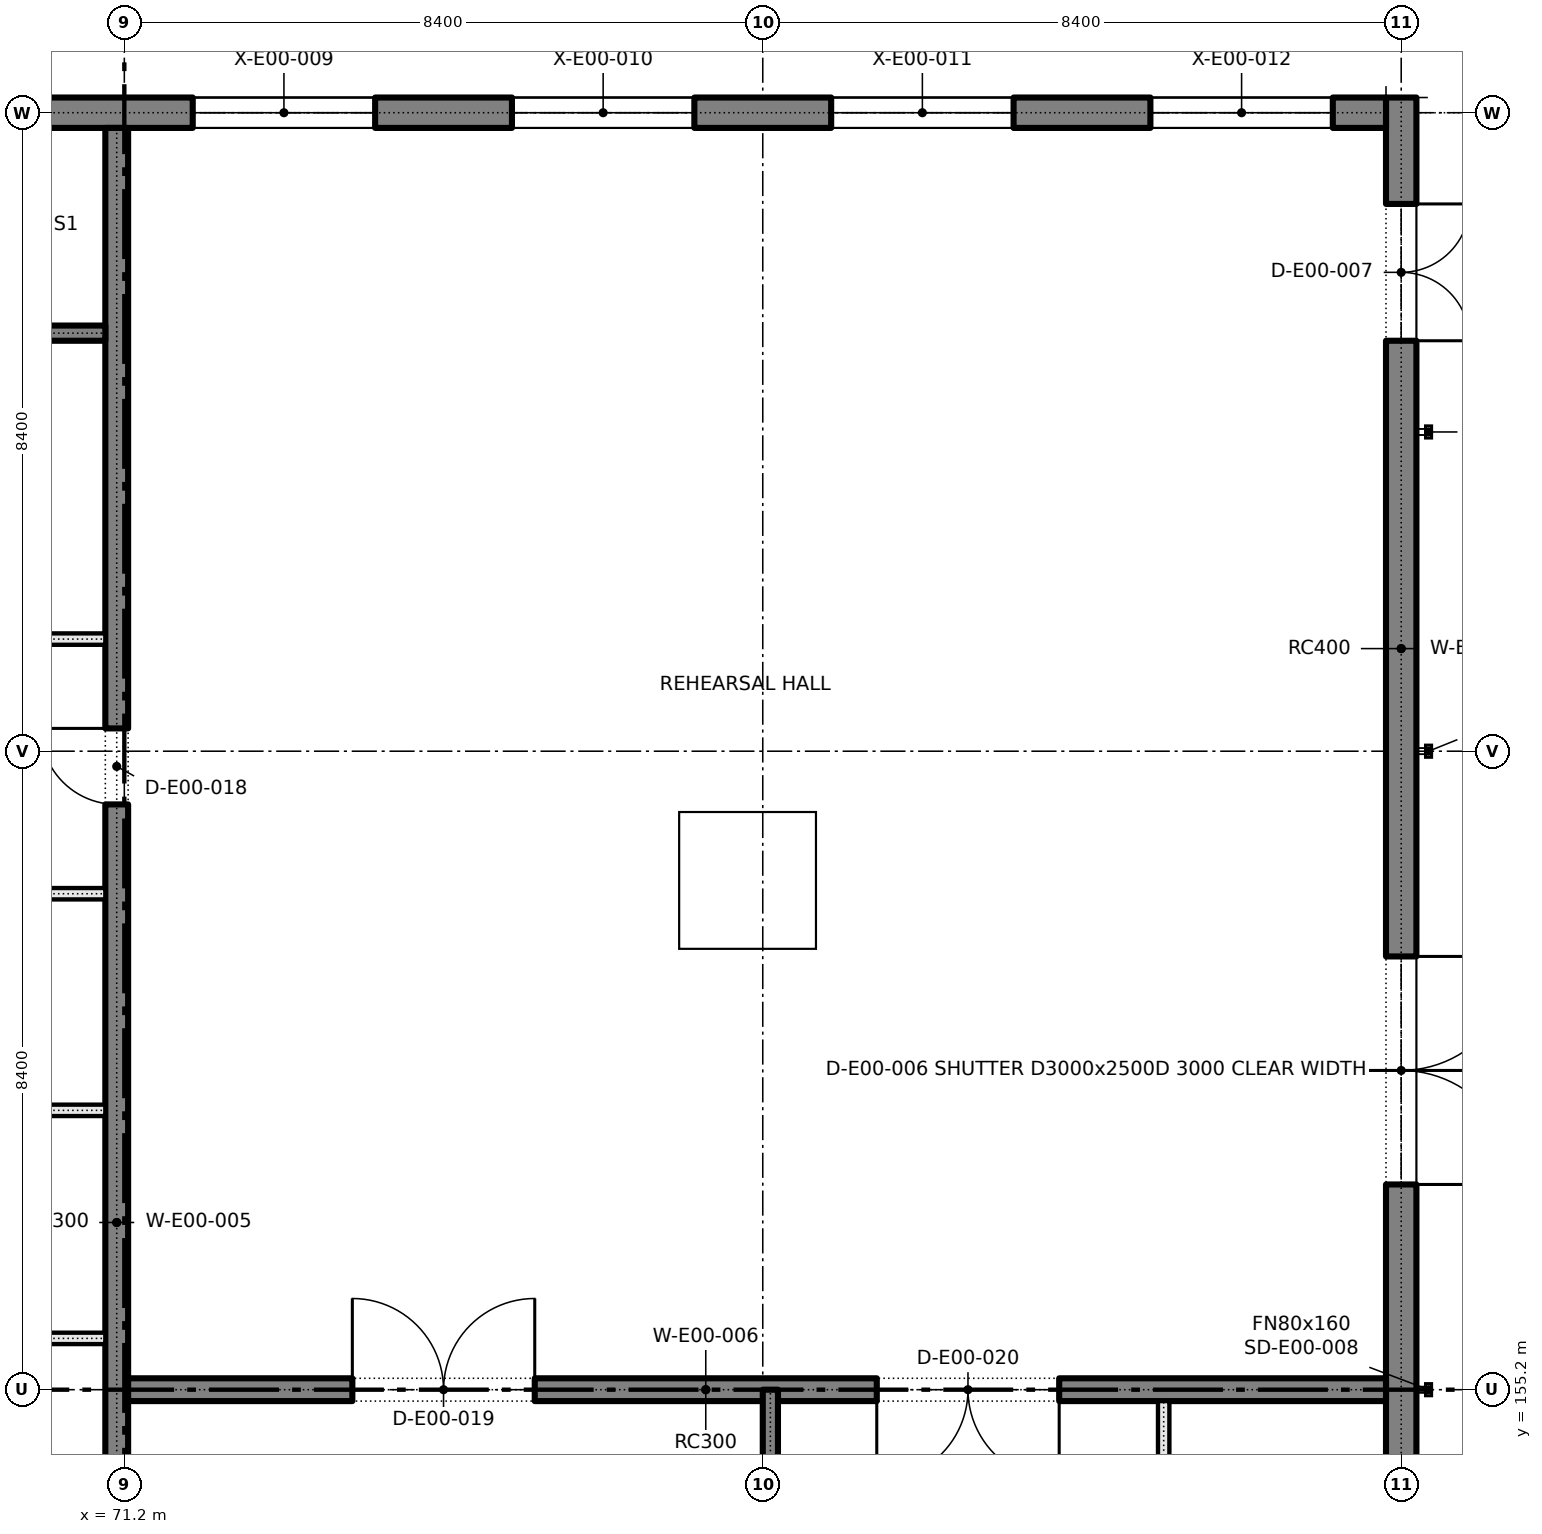
"""IFC4 building model, lengths in metres.
Left out: names, types, materials, properties, quantities, classifications, styles, units other than length and angle.
Written with IfcOpenShell. Run it as: python <this file> out.ifc"""

import sys

from ifc_helpers import new_model, si_unit, direction, frame, frame_2d, origin, place, context, subcontext, project, spatial, rectangle, extrude, element, fill, save


model = new_model("IFC4")
c1 = context("Model", 3, precision=1e-05, world=origin(), true_north=direction((0.0, 1.0)))
c2 = subcontext(c1, "Body", "Model", "MODEL_VIEW")
j1 = project(units=[si_unit("LENGTHUNIT", "METRE"), si_unit("PLANEANGLEUNIT", "RADIAN")], contexts=[c1])
p1 = place(None, origin())
s1 = spatial("IfcSite", under=j1, at=p1, CompositionType="ELEMENT")
p2 = place(p1, origin())
s2 = spatial("IfcBuilding", under=s1, at=p2, CompositionType="ELEMENT")
p3 = place(p2, origin())
s3 = spatial("IfcBuildingStorey", under=s2, at=p3, CompositionType="ELEMENT", Elevation=0.0)
p4 = place(p3, frame((88.0, 146.6, 0.0), z_axis=(0.0, 0.0, 1.0), x_axis=(0.0, 1.0, 0.0)))
e1 = element("IfcWall", 1, at=p4, inside=s3, PredefinedType="SOLIDWALL", context=c2, shape_type="SweptSolid", body=[
    extrude(rectangle(XDim=25.6, YDim=0.4, at=frame_2d((12.8, 0.0))), origin(), (0.0, 0.0, 1.0), 5.4),
])
p5 = place(p4, frame((11.3, 0.0, 0.0)))
e2 = element("IfcOpeningElement", 2, at=p5, cuts=e1, PredefinedType="OPENING", context=c2, shape_type="SweptSolid", body=[
    extrude(rectangle(XDim=3.0, YDim=2.5, at=frame_2d((1.5, 1.25))), frame((0.0, 0.21, 0.0), z_axis=(0.0, -1.0, 0.0), x_axis=(1.0, 0.0, 0.0)), (0.0, 0.0, 1.0), 0.42),
])
p6 = place(p4, frame((22.4, 0.0, 0.0)))
e3 = element("IfcOpeningElement", 3, at=p6, cuts=e1, PredefinedType="OPENING", context=c2, shape_type="SweptSolid", body=[
    extrude(rectangle(XDim=1.8, YDim=2.1, at=frame_2d((0.9, 1.05))), frame((0.0, 0.21, 0.0), z_axis=(0.0, -1.0, 0.0), x_axis=(1.0, 0.0, 0.0)), (0.0, 0.0, 1.0), 0.42),
])
p7 = place(p4, frame((5.2, 0.0, 0.0)))
e4 = element("IfcOpeningElement", 4, at=p7, cuts=e1, PredefinedType="OPENING", context=c2, shape_type="SweptSolid", body=[
    extrude(rectangle(XDim=1.2, YDim=2.1, at=frame_2d((0.6, 1.05))), frame((0.0, 0.21, 0.0), z_axis=(0.0, -1.0, 0.0), x_axis=(1.0, 0.0, 0.0)), (0.0, 0.0, 1.0), 0.42),
])
p8 = place(p3, frame((63.0, 172.0, 0.0), z_axis=(0.0, 0.0, 1.0), x_axis=(1.0, 0.0, 0.0)))
e5 = element("IfcWall", 5, at=p8, inside=s3, PredefinedType="SOLIDWALL", context=c2, shape_type="SweptSolid", body=[
    extrude(rectangle(XDim=24.8, YDim=0.4, at=frame_2d((12.4, 0.0))), origin(), (0.0, 0.0, 1.0), 5.4),
])
p9 = place(p8, frame((9.1, 0.0, 0.9)))
e6 = element("IfcOpeningElement", 6, at=p9, cuts=e5, PredefinedType="OPENING", context=c2, shape_type="SweptSolid", body=[
    extrude(rectangle(XDim=2.4, YDim=2.4, at=frame_2d((1.2, 1.2))), frame((0.0, 0.21, 0.0), z_axis=(0.0, -1.0, 0.0), x_axis=(1.0, 0.0, 0.0)), (0.0, 0.0, 1.0), 0.42),
])
p10 = place(p8, frame((13.3, 0.0, 0.9)))
e7 = element("IfcOpeningElement", 7, at=p10, cuts=e5, PredefinedType="OPENING", context=c2, shape_type="SweptSolid", body=[
    extrude(rectangle(XDim=2.4, YDim=2.4, at=frame_2d((1.2, 1.2))), frame((0.0, 0.21, 0.0), z_axis=(0.0, -1.0, 0.0), x_axis=(1.0, 0.0, 0.0)), (0.0, 0.0, 1.0), 0.42),
])
p11 = place(p8, frame((17.5, 0.0, 0.9)))
e8 = element("IfcOpeningElement", 8, at=p11, cuts=e5, PredefinedType="OPENING", context=c2, shape_type="SweptSolid", body=[
    extrude(rectangle(XDim=2.4, YDim=2.4, at=frame_2d((1.2, 1.2))), frame((0.0, 0.21, 0.0), z_axis=(0.0, -1.0, 0.0), x_axis=(1.0, 0.0, 0.0)), (0.0, 0.0, 1.0), 0.42),
])
p12 = place(p8, frame((21.7, 0.0, 0.9)))
e9 = element("IfcOpeningElement", 9, at=p12, cuts=e5, PredefinedType="OPENING", context=c2, shape_type="SweptSolid", body=[
    extrude(rectangle(XDim=2.4, YDim=2.4, at=frame_2d((1.2, 1.2))), frame((0.0, 0.21, 0.0), z_axis=(0.0, -1.0, 0.0), x_axis=(1.0, 0.0, 0.0)), (0.0, 0.0, 1.0), 0.42),
])
p13 = place(p3, frame((71.1, 147.0, 0.0), z_axis=(0.0, 0.0, 1.0), x_axis=(0.0, 1.0, 0.0)))
e10 = element("IfcWall", 10, at=p13, inside=s3, PredefinedType="SOLIDWALL", context=c2, shape_type="SweptSolid", body=[
    extrude(rectangle(XDim=24.8, YDim=0.3, at=frame_2d((12.4, 0.0))), origin(), (0.0, 0.0, 1.0), 5.4),
])
p14 = place(p13, frame((0.9, 0.0, 0.0)))
e11 = element("IfcOpeningElement", 11, at=p14, cuts=e10, PredefinedType="OPENING", context=c2, shape_type="SweptSolid", body=[
    extrude(rectangle(XDim=1.2, YDim=2.1, at=frame_2d((0.6, 1.05))), frame((0.0, 0.16, 0.0), z_axis=(0.0, -1.0, 0.0), x_axis=(1.0, 0.0, 0.0)), (0.0, 0.0, 1.0), 0.32),
])
p15 = place(p13, frame((3.9, 0.0, 0.0)))
e12 = element("IfcOpeningElement", 12, at=p15, cuts=e10, PredefinedType="OPENING", context=c2, shape_type="SweptSolid", body=[
    extrude(rectangle(XDim=1.0, YDim=2.1, at=frame_2d((0.5, 1.05))), frame((0.0, 0.16, 0.0), z_axis=(0.0, -1.0, 0.0), x_axis=(1.0, 0.0, 0.0)), (0.0, 0.0, 1.0), 0.32),
])
p16 = place(p13, frame((15.9, 0.0, 0.0)))
e13 = element("IfcOpeningElement", 13, at=p16, cuts=e10, PredefinedType="OPENING", context=c2, shape_type="SweptSolid", body=[
    extrude(rectangle(XDim=1.0, YDim=2.1, at=frame_2d((0.5, 1.05))), frame((0.0, 0.16, 0.0), z_axis=(0.0, -1.0, 0.0), x_axis=(1.0, 0.0, 0.0)), (0.0, 0.0, 1.0), 0.32),
])
p17 = place(p3, frame((71.25, 155.2, 0.0), z_axis=(0.0, 0.0, 1.0), x_axis=(1.0, 0.0, 0.0)))
e14 = element("IfcWall", 14, at=p17, inside=s3, PredefinedType="SOLIDWALL", context=c2, shape_type="SweptSolid", body=[
    extrude(rectangle(XDim=16.55, YDim=0.3, at=frame_2d((8.275, 0.0))), origin(), (0.0, 0.0, 1.0), 5.4),
])
p18 = place(p17, frame((2.95, 0.0, 0.0)))
e15 = element("IfcOpeningElement", 15, at=p18, cuts=e14, PredefinedType="OPENING", context=c2, shape_type="SweptSolid", body=[
    extrude(rectangle(XDim=2.4, YDim=2.1, at=frame_2d((1.2, 1.05))), frame((0.0, 0.16, 0.0), z_axis=(0.0, -1.0, 0.0), x_axis=(1.0, 0.0, 0.0)), (0.0, 0.0, 1.0), 0.32),
])
p19 = place(p17, frame((9.85, 0.0, 0.0)))
e16 = element("IfcOpeningElement", 16, at=p19, cuts=e14, PredefinedType="OPENING", context=c2, shape_type="SweptSolid", body=[
    extrude(rectangle(XDim=2.4, YDim=2.1, at=frame_2d((1.2, 1.05))), frame((0.0, 0.16, 0.0), z_axis=(0.0, -1.0, 0.0), x_axis=(1.0, 0.0, 0.0)), (0.0, 0.0, 1.0), 0.32),
])
p20 = place(p3, frame((79.7, 147.0, 0.0), z_axis=(0.0, 0.0, 1.0), x_axis=(0.0, 1.0, 0.0)))
e17 = element("IfcWall", 17, at=p20, inside=s3, PredefinedType="SOLIDWALL", context=c2, shape_type="SweptSolid", body=[
    extrude(rectangle(XDim=8.2, YDim=0.2, at=frame_2d((4.1, 0.0))), origin(), (0.0, 0.0, 1.0), 5.4),
])
p21 = place(p20, frame((0.7, 0.0, 0.0)))
e18 = element("IfcOpeningElement", 18, at=p21, cuts=e17, PredefinedType="OPENING", context=c2, shape_type="SweptSolid", body=[
    extrude(rectangle(XDim=1.2, YDim=2.1, at=frame_2d((0.6, 1.05))), frame((0.0, 0.11, 0.0), z_axis=(0.0, -1.0, 0.0), x_axis=(1.0, 0.0, 0.0)), (0.0, 0.0, 1.0), 0.22),
])
p22 = place(p20, frame((4.8, 0.0, 0.0)))
e19 = element("IfcOpeningElement", 19, at=p22, cuts=e17, PredefinedType="OPENING", context=c2, shape_type="SweptSolid", body=[
    extrude(rectangle(XDim=1.2, YDim=2.1, at=frame_2d((0.6, 1.05))), frame((0.0, 0.11, 0.0), z_axis=(0.0, -1.0, 0.0), x_axis=(1.0, 0.0, 0.0)), (0.0, 0.0, 1.0), 0.22),
])
p23 = place(p3, frame((63.0, 169.1, 0.0), z_axis=(0.0, 0.0, 1.0), x_axis=(1.0, 0.0, 0.0)))
e20 = element("IfcWall", 20, at=p23, inside=s3, PredefinedType="SOLIDWALL", context=c2, shape_type="SweptSolid", body=[
    extrude(rectangle(XDim=7.95, YDim=0.2, at=frame_2d((3.975, 0.0))), origin(), (0.0, 0.0, 1.0), 5.4),
])
p24 = place(p23, frame((0.1, 0.0, 0.0)))
e21 = element("IfcOpeningElement", 21, at=p24, cuts=e20, PredefinedType="OPENING", context=c2, shape_type="SweptSolid", body=[
    extrude(rectangle(XDim=1.2, YDim=2.1, at=frame_2d((0.6, 1.05))), frame((0.0, 0.11, 0.0), z_axis=(0.0, -1.0, 0.0), x_axis=(1.0, 0.0, 0.0)), (0.0, 0.0, 1.0), 0.22),
])
for number, where, z_axis, x_axis in (
    (22, (64.8, 155.875, 0.0), (0.0, 0.0, 1.0), (1.0, 0.0, 0.0)),
    (23, (64.8, 158.875, 0.0), (0.0, 0.0, 1.0), (1.0, 0.0, 0.0)),
    (24, (64.8, 161.725, 0.0), (0.0, 0.0, 1.0), (1.0, 0.0, 0.0)),
    (25, (64.8, 165.075, 0.0), (0.0, 0.0, 1.0), (1.0, 0.0, 0.0)),
):
    element("IfcWall", number, at=place(p3, frame(where, z_axis=z_axis, x_axis=x_axis)), inside=s3, PredefinedType="PARTITIONING", context=c2, shape_type="SweptSolid", body=[
        extrude(rectangle(XDim=6.15, YDim=0.15, at=frame_2d((3.075, 0.0))), origin(), (0.0, 0.0, 1.0), 5.1),
    ])
p25 = place(p3, frame((84.875, 149.8, 0.0), z_axis=(0.0, 0.0, 1.0), x_axis=(0.0, 1.0, 0.0)))
e26 = element("IfcWall", 26, at=p25, inside=s3, PredefinedType="PARTITIONING", context=c2, shape_type="SweptSolid", body=[
    extrude(rectangle(XDim=5.25, YDim=0.15, at=frame_2d((2.625, 0.0))), origin(), (0.0, 0.0, 1.0), 5.1),
])
p26 = place(p5, frame((3.0, 0.0, 0.0), z_axis=(0.0, 0.0, 1.0), x_axis=(-1.0, 0.0, 0.0)))
e27 = element("IfcDoor", 27, at=p26, inside=s3, OperationType="DOUBLE_DOOR_SINGLE_SWING", PredefinedType="DOOR", context=c2, shape_type="SweptSolid", body=[
    extrude(rectangle(XDim=3.0, YDim=2.5, at=frame_2d((1.5, 1.25))), frame((0.0, 0.025, 0.0), z_axis=(0.0, -1.0, 0.0), x_axis=(1.0, 0.0, 0.0)), (0.0, 0.0, 1.0), 0.05),
])
fill(e2, e27)
p27 = place(p6, frame((1.8, 0.0, 0.0), z_axis=(0.0, 0.0, 1.0), x_axis=(-1.0, 0.0, 0.0)))
e28 = element("IfcDoor", 28, at=p27, inside=s3, OperationType="DOUBLE_DOOR_SINGLE_SWING", PredefinedType="DOOR", context=c2, shape_type="SweptSolid", body=[
    extrude(rectangle(XDim=1.8, YDim=2.1, at=frame_2d((0.9, 1.05))), frame((0.0, 0.025, 0.0), z_axis=(0.0, -1.0, 0.0), x_axis=(1.0, 0.0, 0.0)), (0.0, 0.0, 1.0), 0.05),
])
fill(e3, e28)
p28 = place(p9, origin())
e29 = element("IfcWindow", 29, at=p28, inside=s3, PartitioningType="SINGLE_PANEL", PredefinedType="WINDOW", context=c2, shape_type="SweptSolid", body=[
    extrude(rectangle(XDim=2.4, YDim=2.4, at=frame_2d((1.2, 1.2))), frame((0.0, 0.03, 0.0), z_axis=(0.0, -1.0, 0.0), x_axis=(1.0, 0.0, 0.0)), (0.0, 0.0, 1.0), 0.06),
])
fill(e6, e29)
p29 = place(p10, origin())
e30 = element("IfcWindow", 30, at=p29, inside=s3, PartitioningType="SINGLE_PANEL", PredefinedType="WINDOW", context=c2, shape_type="SweptSolid", body=[
    extrude(rectangle(XDim=2.4, YDim=2.4, at=frame_2d((1.2, 1.2))), frame((0.0, 0.03, 0.0), z_axis=(0.0, -1.0, 0.0), x_axis=(1.0, 0.0, 0.0)), (0.0, 0.0, 1.0), 0.06),
])
fill(e7, e30)
p30 = place(p11, origin())
e31 = element("IfcWindow", 31, at=p30, inside=s3, PartitioningType="SINGLE_PANEL", PredefinedType="WINDOW", context=c2, shape_type="SweptSolid", body=[
    extrude(rectangle(XDim=2.4, YDim=2.4, at=frame_2d((1.2, 1.2))), frame((0.0, 0.03, 0.0), z_axis=(0.0, -1.0, 0.0), x_axis=(1.0, 0.0, 0.0)), (0.0, 0.0, 1.0), 0.06),
])
fill(e8, e31)
p31 = place(p12, origin())
e32 = element("IfcWindow", 32, at=p31, inside=s3, PartitioningType="SINGLE_PANEL", PredefinedType="WINDOW", context=c2, shape_type="SweptSolid", body=[
    extrude(rectangle(XDim=2.4, YDim=2.4, at=frame_2d((1.2, 1.2))), frame((0.0, 0.03, 0.0), z_axis=(0.0, -1.0, 0.0), x_axis=(1.0, 0.0, 0.0)), (0.0, 0.0, 1.0), 0.06),
])
fill(e9, e32)
p32 = place(p16, origin())
e33 = element("IfcDoor", 33, at=p32, inside=s3, OperationType="SINGLE_SWING_RIGHT", PredefinedType="DOOR", context=c2, shape_type="SweptSolid", body=[
    extrude(rectangle(XDim=1.0, YDim=2.1, at=frame_2d((0.5, 1.05))), frame((0.0, 0.025, 0.0), z_axis=(0.0, -1.0, 0.0), x_axis=(1.0, 0.0, 0.0)), (0.0, 0.0, 1.0), 0.05),
])
fill(e13, e33)
p33 = place(p18, origin())
e34 = element("IfcDoor", 34, at=p33, inside=s3, OperationType="DOUBLE_DOOR_SINGLE_SWING", PredefinedType="DOOR", context=c2, shape_type="SweptSolid", body=[
    extrude(rectangle(XDim=2.4, YDim=2.1, at=frame_2d((1.2, 1.05))), frame((0.0, 0.025, 0.0), z_axis=(0.0, -1.0, 0.0), x_axis=(1.0, 0.0, 0.0)), (0.0, 0.0, 1.0), 0.05),
])
fill(e15, e34)
p34 = place(p19, frame((2.4, 0.0, 0.0), z_axis=(0.0, 0.0, 1.0), x_axis=(-1.0, 0.0, 0.0)))
e35 = element("IfcDoor", 35, at=p34, inside=s3, OperationType="DOUBLE_DOOR_SINGLE_SWING", PredefinedType="DOOR", context=c2, shape_type="SweptSolid", body=[
    extrude(rectangle(XDim=2.4, YDim=2.1, at=frame_2d((1.2, 1.05))), frame((0.0, 0.025, 0.0), z_axis=(0.0, -1.0, 0.0), x_axis=(1.0, 0.0, 0.0)), (0.0, 0.0, 1.0), 0.05),
])
fill(e16, e35)
save(model, sys.argv[1])
